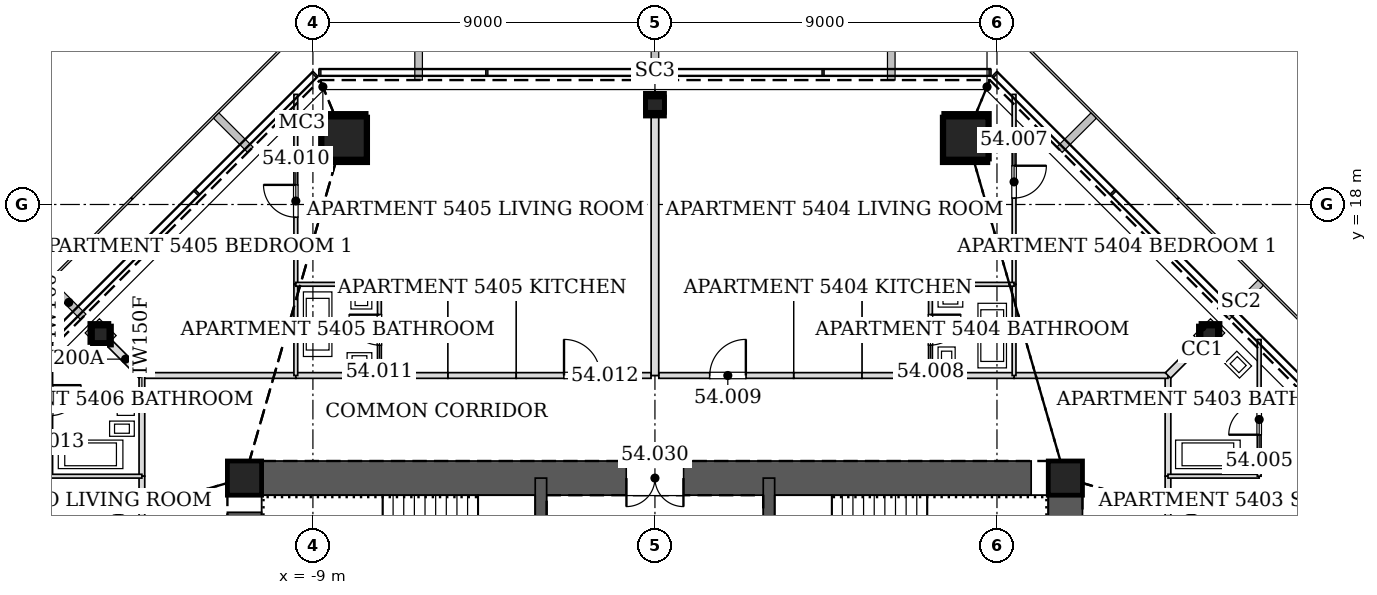
"""IFC4 building model, lengths in metres.
Left out: names, types, materials, properties, quantities, classifications, styles, units other than length and angle.
Written with IfcOpenShell. Run it as: python <this file> out.ifc"""

import sys

from ifc_helpers import new_model, si_unit, direction, frame, frame_2d, origin, origin_2d, place, context, subcontext, project, spatial, rectangle, hollow_rectangle, extrude, element, fill, save


model = new_model("IFC4")
c1 = context("Model", 3, precision=1e-05, world=origin(), true_north=direction((0.0, 1.0)))
c2 = subcontext(c1, "Body", "Model", "MODEL_VIEW")
j1 = project(units=[si_unit("LENGTHUNIT", "METRE"), si_unit("PLANEANGLEUNIT", "RADIAN")], contexts=[c1])
p1 = place(None, origin())
s1 = spatial("IfcSite", under=j1, at=p1, CompositionType="ELEMENT")
p2 = place(p1, origin())
s2 = spatial("IfcBuilding", under=s1, at=p2, CompositionType="ELEMENT")
p3 = place(p2, frame((0.0, 0.0, 231.2)))
s3 = spatial("IfcBuildingStorey", under=s2, at=p3, CompositionType="ELEMENT", Elevation=231.2)
for number, where, z_axis, x_axis in (
    (1, (8.2, 19.796, 0.0), (-0.012, -0.028, 1.0), (0.923, -0.384, 0.0)),
    (2, (-8.2, 19.796, 0.0), (0.012, -0.028, 1.0), (0.923, 0.384, 0.0)),
):
    element("IfcColumn", number, at=place(p3, frame(where, z_axis=z_axis, x_axis=x_axis)), inside=s3, PredefinedType="COLUMN", context=c2, shape_type="SweptSolid", body=[
        extrude(hollow_rectangle(XDim=1.2, YDim=1.2, WallThickness=0.055, at=origin_2d()), origin(), (0.0, 0.0, 1.0), 3.402),
    ])
for number, where, z_axis, x_axis in (
    (3, (14.619, 14.619, 0.0), (-0.02, -0.02, 1.0), (0.707, -0.707, 0.0)),
    (4, (0.0, 20.674, 0.0), (0.0, -0.028, 1.0), (1.0, 0.0, 0.0)),
    (5, (-14.619, 14.619, 0.0), (0.02, -0.02, 1.0), (0.707, 0.707, 0.0)),
):
    element("IfcColumn", number, at=place(p3, frame(where, z_axis=z_axis, x_axis=x_axis)), inside=s3, PredefinedType="COLUMN", context=c2, shape_type="SweptSolid", body=[
        extrude(hollow_rectangle(XDim=0.5, YDim=0.5, WallThickness=0.025, at=origin_2d()), origin(), (0.0, 0.0, 1.0), 3.402),
    ])
for number, where, z_axis, x_axis in (
    (6, (10.8, 10.8, 0.0), (0.0, 0.0, 1.0), (1.0, 0.0, 0.0)),
    (7, (-10.8, 10.8, 0.0), (0.0, 0.0, 1.0), (1.0, 0.0, 0.0)),
):
    element("IfcColumn", number, at=place(p3, frame(where, z_axis=z_axis, x_axis=x_axis)), inside=s3, PredefinedType="COLUMN", context=c2, shape_type="SweptSolid", body=[
        extrude(hollow_rectangle(XDim=0.9, YDim=0.9, WallThickness=0.05, at=origin_2d()), origin(), (0.0, 0.0, 1.0), 3.4),
    ])
p4 = place(p3, frame((10.8, -10.8, 0.0), z_axis=(0.0, 0.0, 1.0), x_axis=(0.0, 1.0, 0.0)))
e8 = element("IfcWall", 8, at=p4, inside=s3, PredefinedType="SOLIDWALL", context=c2, shape_type="SweptSolid", body=[
    extrude(rectangle(XDim=21.6, YDim=0.9, at=frame_2d((10.8, 0.0))), origin(), (0.0, 0.0, 1.0), 3.4),
])
p5 = place(p4, frame((11.7, 0.0, 0.0)))
e9 = element("IfcOpeningElement", 9, at=p5, cuts=e8, PredefinedType="OPENING", context=c2, shape_type="SweptSolid", body=[
    extrude(rectangle(XDim=1.2, YDim=2.1, at=frame_2d((0.6, 1.05))), frame((0.0, 0.46, 0.0), z_axis=(0.0, -1.0, 0.0), x_axis=(1.0, 0.0, 0.0)), (0.0, 0.0, 1.0), 0.92),
])
p6 = place(p4, frame((8.7, 0.0, 0.0)))
e10 = element("IfcOpeningElement", 10, at=p6, cuts=e8, PredefinedType="OPENING", context=c2, shape_type="SweptSolid", body=[
    extrude(rectangle(XDim=1.2, YDim=2.1, at=frame_2d((0.6, 1.05))), frame((0.0, 0.46, 0.0), z_axis=(0.0, -1.0, 0.0), x_axis=(1.0, 0.0, 0.0)), (0.0, 0.0, 1.0), 0.92),
])
p7 = place(p3, frame((10.8, 10.8, 0.0), z_axis=(0.0, 0.0, 1.0), x_axis=(-1.0, 0.0, 0.0)))
e11 = element("IfcWall", 11, at=p7, inside=s3, PredefinedType="SOLIDWALL", context=c2, shape_type="SweptSolid", body=[
    extrude(rectangle(XDim=21.6, YDim=0.9, at=frame_2d((10.8, 0.0))), origin(), (0.0, 0.0, 1.0), 3.4),
])
p8 = place(p7, frame((10.05, 0.0, 0.0)))
e12 = element("IfcOpeningElement", 12, at=p8, cuts=e11, PredefinedType="OPENING", context=c2, shape_type="SweptSolid", body=[
    extrude(rectangle(XDim=1.5, YDim=2.1, at=frame_2d((0.75, 1.05))), frame((0.0, 0.46, 0.0), z_axis=(0.0, -1.0, 0.0), x_axis=(1.0, 0.0, 0.0)), (0.0, 0.0, 1.0), 0.92),
])
p9 = place(p3, frame((-10.8, 10.8, 0.0), z_axis=(0.0, 0.0, 1.0), x_axis=(0.0, -1.0, 0.0)))
e13 = element("IfcWall", 13, at=p9, inside=s3, PredefinedType="SOLIDWALL", context=c2, shape_type="SweptSolid", body=[
    extrude(rectangle(XDim=21.6, YDim=0.9, at=frame_2d((10.8, 0.0))), origin(), (0.0, 0.0, 1.0), 3.4),
])
p10 = place(p9, frame((8.7, 0.0, 0.0)))
e14 = element("IfcOpeningElement", 14, at=p10, cuts=e13, PredefinedType="OPENING", context=c2, shape_type="SweptSolid", body=[
    extrude(rectangle(XDim=1.2, YDim=2.1, at=frame_2d((0.6, 1.05))), frame((0.0, 0.46, 0.0), z_axis=(0.0, -1.0, 0.0), x_axis=(1.0, 0.0, 0.0)), (0.0, 0.0, 1.0), 0.92),
])
p11 = place(p9, frame((11.7, 0.0, 0.0)))
e15 = element("IfcOpeningElement", 15, at=p11, cuts=e13, PredefinedType="OPENING", context=c2, shape_type="SweptSolid", body=[
    extrude(rectangle(XDim=1.2, YDim=2.1, at=frame_2d((0.6, 1.05))), frame((0.0, 0.46, 0.0), z_axis=(0.0, -1.0, 0.0), x_axis=(1.0, 0.0, 0.0)), (0.0, 0.0, 1.0), 0.92),
])
p12 = place(p3, frame((-3.0, 6.0, 0.0), z_axis=(0.0, 0.0, 1.0), x_axis=(0.0, 1.0, 0.0)))
e16 = element("IfcWall", 16, at=p12, inside=s3, PredefinedType="SOLIDWALL", context=c2, shape_type="SweptSolid", body=[
    extrude(rectangle(XDim=4.8, YDim=0.3, at=frame_2d((2.4, 0.0))), origin(), (0.0, 0.0, 1.0), 3.4),
])
p13 = place(p12, frame((1.75, 0.0, 0.0)))
e17 = element("IfcOpeningElement", 17, at=p13, cuts=e16, PredefinedType="OPENING", context=c2, shape_type="SweptSolid", body=[
    extrude(rectangle(XDim=1.0, YDim=2.1, at=frame_2d((0.5, 1.05))), frame((0.0, 0.16, 0.0), z_axis=(0.0, -1.0, 0.0), x_axis=(1.0, 0.0, 0.0)), (0.0, 0.0, 1.0), 0.32),
])
p14 = place(p3, frame((3.0, 6.0, 0.0), z_axis=(0.0, 0.0, 1.0), x_axis=(0.0, 1.0, 0.0)))
e18 = element("IfcWall", 18, at=p14, inside=s3, PredefinedType="SOLIDWALL", context=c2, shape_type="SweptSolid", body=[
    extrude(rectangle(XDim=4.8, YDim=0.3, at=frame_2d((2.4, 0.0))), origin(), (0.0, 0.0, 1.0), 3.4),
])
p15 = place(p14, frame((1.75, 0.0, 0.0)))
e19 = element("IfcOpeningElement", 19, at=p15, cuts=e18, PredefinedType="OPENING", context=c2, shape_type="SweptSolid", body=[
    extrude(rectangle(XDim=1.0, YDim=2.1, at=frame_2d((0.5, 1.05))), frame((0.0, 0.16, 0.0), z_axis=(0.0, -1.0, 0.0), x_axis=(1.0, 0.0, 0.0)), (0.0, 0.0, 1.0), 0.32),
])
p16 = place(p3, frame((13.5, 10.849, 0.0), z_axis=(0.0, 0.0, 1.0), x_axis=(0.0, 1.0, 0.0)))
e20 = element("IfcWall", 20, at=p16, inside=s3, PredefinedType="PARTITIONING", context=c2, shape_type="SweptSolid", body=[
    extrude(rectangle(XDim=2.651, YDim=0.15, at=frame_2d((1.325, 0.0))), origin(), (0.0, 0.0, 1.0), 2.583),
])
p17 = place(p3, frame((13.5, 9.049, 0.0), z_axis=(0.0, 0.0, 1.0), x_axis=(0.0, 1.0, 0.0)))
e21 = element("IfcWall", 21, at=p17, inside=s3, PredefinedType="PARTITIONING", context=c2, shape_type="SweptSolid", body=[
    extrude(rectangle(XDim=1.802, YDim=0.15, at=frame_2d((0.901, 0.0))), origin(), (0.0, 0.0, 1.0), 2.344),
])
p18 = place(p3, frame((13.5, 13.5, 0.0), z_axis=(0.0, 0.0, 1.0), x_axis=(-1.0, 0.0, 0.0)))
e22 = element("IfcWall", 22, at=p18, inside=s3, PredefinedType="PARTITIONING", context=c2, shape_type="SweptSolid", body=[
    extrude(rectangle(XDim=4.051, YDim=0.15, at=frame_2d((2.025, 0.0))), origin(), (0.0, 0.0, 1.0), 2.344),
])
p19 = place(p3, frame((9.451, 13.5, 0.0), z_axis=(0.0, 0.0, 1.0), x_axis=(-1.0, 0.0, 0.0)))
e23 = element("IfcWall", 23, at=p19, inside=s3, PredefinedType="PARTITIONING", context=c2, shape_type="SweptSolid", body=[
    extrude(rectangle(XDim=2.202, YDim=0.15, at=frame_2d((1.101, 0.0))), origin(), (0.0, 0.0, 1.0), 3.2),
])
p20 = place(p3, frame((5.451, 13.5, 0.0), z_axis=(0.0, 0.0, 1.0), x_axis=(-1.0, 0.0, 0.0)))
e24 = element("IfcWall", 24, at=p20, inside=s3, PredefinedType="PARTITIONING", context=c2, shape_type="SweptSolid", body=[
    extrude(rectangle(XDim=1.802, YDim=0.15, at=frame_2d((0.901, 0.0))), origin(), (0.0, 0.0, 1.0), 3.2),
])
p21 = place(p3, frame((3.651, 13.5, 0.0), z_axis=(0.0, 0.0, 1.0), x_axis=(-1.0, 0.0, 0.0)))
e25 = element("IfcWall", 25, at=p21, inside=s3, PredefinedType="PARTITIONING", context=c2, shape_type="SweptSolid", body=[
    extrude(rectangle(XDim=3.549, YDim=0.15, at=frame_2d((1.774, 0.0))), origin(), (0.0, 0.0, 1.0), 3.2),
])
p22 = place(p21, frame((1.259, 0.0, 0.0)))
e26 = element("IfcOpeningElement", 26, at=p22, cuts=e25, PredefinedType="OPENING", context=c2, shape_type="SweptSolid", body=[
    extrude(rectangle(XDim=0.95, YDim=2.1, at=frame_2d((0.475, 1.05))), frame((0.0, 0.085, 0.0), z_axis=(0.0, -1.0, 0.0), x_axis=(1.0, 0.0, 0.0)), (0.0, 0.0, 1.0), 0.17),
])
p23 = place(p3, frame((7.251, 13.5, 0.0), z_axis=(0.0, 0.0, 1.0), x_axis=(-1.0, 0.0, 0.0)))
e27 = element("IfcWall", 27, at=p23, inside=s3, PredefinedType="PARTITIONING", context=c2, shape_type="SweptSolid", body=[
    extrude(rectangle(XDim=1.802, YDim=0.15, at=frame_2d((0.901, 0.0))), origin(), (0.0, 0.0, 1.0), 3.2),
])
p24 = place(p3, frame((-9.449, 13.5, 0.0), z_axis=(0.0, 0.0, 1.0), x_axis=(-1.0, 0.0, 0.0)))
e28 = element("IfcWall", 28, at=p24, inside=s3, PredefinedType="PARTITIONING", context=c2, shape_type="SweptSolid", body=[
    extrude(rectangle(XDim=4.051, YDim=0.15, at=frame_2d((2.025, 0.0))), origin(), (0.0, 0.0, 1.0), 2.344),
])
p25 = place(p3, frame((-7.249, 13.5, 0.0), z_axis=(0.0, 0.0, 1.0), x_axis=(-1.0, 0.0, 0.0)))
e29 = element("IfcWall", 29, at=p25, inside=s3, PredefinedType="PARTITIONING", context=c2, shape_type="SweptSolid", body=[
    extrude(rectangle(XDim=2.202, YDim=0.15, at=frame_2d((1.101, 0.0))), origin(), (0.0, 0.0, 1.0), 3.2),
])
for number, where, z_axis, x_axis in (
    (30, (-3.649, 13.5, 0.0), (0.0, 0.0, 1.0), (-1.0, 0.0, 0.0)),
    (31, (-5.449, 13.5, 0.0), (0.0, 0.0, 1.0), (-1.0, 0.0, 0.0)),
):
    element("IfcWall", number, at=place(p3, frame(where, z_axis=z_axis, x_axis=x_axis)), inside=s3, PredefinedType="PARTITIONING", context=c2, shape_type="SweptSolid", body=[
        extrude(rectangle(XDim=1.802, YDim=0.15, at=frame_2d((0.901, 0.0))), origin(), (0.0, 0.0, 1.0), 3.2),
    ])
p26 = place(p3, frame((-0.102, 13.5, 0.0), z_axis=(0.0, 0.0, 1.0), x_axis=(-1.0, 0.0, 0.0)))
e32 = element("IfcWall", 32, at=p26, inside=s3, PredefinedType="PARTITIONING", context=c2, shape_type="SweptSolid", body=[
    extrude(rectangle(XDim=3.549, YDim=0.15, at=frame_2d((1.774, 0.0))), origin(), (0.0, 0.0, 1.0), 3.2),
])
p27 = place(p26, frame((1.34, 0.0, 0.0)))
e33 = element("IfcOpeningElement", 33, at=p27, cuts=e32, PredefinedType="OPENING", context=c2, shape_type="SweptSolid", body=[
    extrude(rectangle(XDim=0.95, YDim=2.1, at=frame_2d((0.475, 1.05))), frame((0.0, 0.085, 0.0), z_axis=(0.0, -1.0, 0.0), x_axis=(1.0, 0.0, 0.0)), (0.0, 0.0, 1.0), 0.17),
])
p28 = place(p3, frame((-13.5, 13.5, 0.0), z_axis=(0.0, 0.0, 1.0), x_axis=(0.0, -1.0, 0.0)))
e34 = element("IfcWall", 34, at=p28, inside=s3, PredefinedType="PARTITIONING", context=c2, shape_type="SweptSolid", body=[
    extrude(rectangle(XDim=2.651, YDim=0.15, at=frame_2d((1.325, 0.0))), origin(), (0.0, 0.0, 1.0), 2.583),
])
p29 = place(p3, frame((-13.5, 10.851, 0.0), z_axis=(0.0, 0.0, 1.0), x_axis=(0.0, -1.0, 0.0)))
e35 = element("IfcWall", 35, at=p29, inside=s3, PredefinedType="PARTITIONING", context=c2, shape_type="SweptSolid", body=[
    extrude(rectangle(XDim=1.802, YDim=0.15, at=frame_2d((0.901, 0.0))), origin(), (0.0, 0.0, 1.0), 2.344),
])
p30 = place(p3, frame((13.5, 10.85, 0.0), z_axis=(0.0, 0.0, 1.0), x_axis=(1.0, 0.0, 0.0)))
e36 = element("IfcWall", 36, at=p30, inside=s3, PredefinedType="PARTITIONING", context=c2, shape_type="SweptSolid", body=[
    extrude(rectangle(XDim=2.4, YDim=0.1, at=frame_2d((1.2, 0.0))), origin(), (0.0, 0.0, 1.0), 2.786),
])
p31 = place(p3, frame((15.9, 10.85, 0.0), z_axis=(0.0, 0.0, 1.0), x_axis=(0.0, 1.0, 0.0)))
e37 = element("IfcWall", 37, at=p31, inside=s3, PredefinedType="PARTITIONING", context=c2, shape_type="SweptSolid", body=[
    extrude(rectangle(XDim=3.597, YDim=0.1, at=frame_2d((1.799, 0.0))), origin(), (0.0, 0.0, 1.0), 2.784),
])
p32 = place(p31, frame((1.092, 0.0, 0.0)))
e38 = element("IfcOpeningElement", 38, at=p32, cuts=e37, PredefinedType="OPENING", context=c2, shape_type="SweptSolid", body=[
    extrude(rectangle(XDim=0.8, YDim=2.1, at=frame_2d((0.4, 1.05))), frame((0.0, 0.06, 0.0), z_axis=(0.0, -1.0, 0.0), x_axis=(1.0, 0.0, 0.0)), (0.0, 0.0, 1.0), 0.12),
])
p33 = place(p3, frame((14.361, 14.361, 0.0), z_axis=(0.0, 0.0, 1.0), x_axis=(-0.707106781187, -0.707106781187, 0.0)))
e39 = element("IfcWall", 39, at=p33, inside=s3, PredefinedType="PARTITIONING", context=c2, shape_type="SweptSolid", body=[
    extrude(rectangle(XDim=1.217, YDim=0.2, at=frame_2d((0.608, 0.0))), origin(), (0.0, 0.0, 1.0), 2.583),
])
p34 = place(p3, frame((9.45, 15.901, 0.0), z_axis=(0.0, 0.0, 1.0), x_axis=(0.0, -1.0, 0.0)))
e40 = element("IfcWall", 40, at=p34, inside=s3, PredefinedType="PARTITIONING", context=c2, shape_type="SweptSolid", body=[
    extrude(rectangle(XDim=2.401, YDim=0.1, at=frame_2d((1.2, 0.0))), origin(), (0.0, 0.0, 1.0), 2.344),
])
p35 = place(p3, frame((9.45, 20.898, 0.0), z_axis=(0.0, 0.0, 1.0), x_axis=(0.0, -1.0, 0.0)))
e41 = element("IfcWall", 41, at=p35, inside=s3, PredefinedType="PARTITIONING", context=c2, shape_type="SweptSolid", body=[
    extrude(rectangle(XDim=4.999, YDim=0.1, at=frame_2d((2.5, 0.0))), origin(), (0.0, 0.0, 1.0), 2.344),
])
p36 = place(p35, frame((1.877, 0.0, 0.0)))
e42 = element("IfcOpeningElement", 42, at=p36, cuts=e41, PredefinedType="OPENING", context=c2, shape_type="SweptSolid", body=[
    extrude(rectangle(XDim=0.85, YDim=2.1, at=frame_2d((0.425, 1.05))), frame((0.0, 0.06, 0.0), z_axis=(0.0, -1.0, 0.0), x_axis=(1.0, 0.0, 0.0)), (0.0, 0.0, 1.0), 0.12),
])
p37 = place(p3, frame((9.45, 15.9, 0.0), z_axis=(0.0, 0.0, 1.0), x_axis=(-1.0, 0.0, 0.0)))
e43 = element("IfcWall", 43, at=p37, inside=s3, PredefinedType="PARTITIONING", context=c2, shape_type="SweptSolid", body=[
    extrude(rectangle(XDim=2.2, YDim=0.1, at=frame_2d((1.1, 0.0))), origin(), (0.0, 0.0, 1.0), 2.344),
])
p38 = place(p3, frame((7.25, 15.9, 0.0), z_axis=(0.0, 0.0, 1.0), x_axis=(0.0, -1.0, 0.0)))
e44 = element("IfcWall", 44, at=p38, inside=s3, PredefinedType="PARTITIONING", context=c2, shape_type="SweptSolid", body=[
    extrude(rectangle(XDim=2.4, YDim=0.1, at=frame_2d((1.2, 0.0))), origin(), (0.0, 0.0, 1.0), 2.664),
])
p39 = place(p38, frame((0.8, 0.0, 0.0)))
e45 = element("IfcOpeningElement", 45, at=p39, cuts=e44, PredefinedType="OPENING", context=c2, shape_type="SweptSolid", body=[
    extrude(rectangle(XDim=0.8, YDim=2.1, at=frame_2d((0.4, 1.05))), frame((0.0, 0.06, 0.0), z_axis=(0.0, -1.0, 0.0), x_axis=(1.0, 0.0, 0.0)), (0.0, 0.0, 1.0), 0.12),
])
p40 = place(p3, frame((0.0, 20.309, 0.0), z_axis=(0.0, 0.0, 1.0), x_axis=(0.0, -1.0, 0.0)))
e46 = element("IfcWall", 46, at=p40, inside=s3, PredefinedType="PARTITIONING", context=c2, shape_type="SweptSolid", body=[
    extrude(rectangle(XDim=6.809, YDim=0.2, at=frame_2d((3.405, 0.0))), origin(), (0.0, 0.0, 1.0), 2.253),
])
p41 = place(p3, frame((-9.45, 13.5, 0.0), z_axis=(0.0, 0.0, 1.0), x_axis=(0.0, 1.0, 0.0)))
e47 = element("IfcWall", 47, at=p41, inside=s3, PredefinedType="PARTITIONING", context=c2, shape_type="SweptSolid", body=[
    extrude(rectangle(XDim=2.401, YDim=0.1, at=frame_2d((1.2, 0.0))), origin(), (0.0, 0.0, 1.0), 2.344),
])
p42 = place(p3, frame((-9.45, 15.899, 0.0), z_axis=(0.0, 0.0, 1.0), x_axis=(0.0, 1.0, 0.0)))
e48 = element("IfcWall", 48, at=p42, inside=s3, PredefinedType="PARTITIONING", context=c2, shape_type="SweptSolid", body=[
    extrude(rectangle(XDim=4.999, YDim=0.1, at=frame_2d((2.5, 0.0))), origin(), (0.0, 0.0, 1.0), 2.344),
])
p43 = place(p42, frame((1.767, 0.0, 0.0)))
e49 = element("IfcOpeningElement", 49, at=p43, cuts=e48, PredefinedType="OPENING", context=c2, shape_type="SweptSolid", body=[
    extrude(rectangle(XDim=0.85, YDim=2.1, at=frame_2d((0.425, 1.05))), frame((0.0, 0.06, 0.0), z_axis=(0.0, -1.0, 0.0), x_axis=(1.0, 0.0, 0.0)), (0.0, 0.0, 1.0), 0.12),
])
p44 = place(p3, frame((-14.361, 14.361, 0.0), z_axis=(0.0, 0.0, 1.0), x_axis=(0.707106781187, -0.707106781187, 0.0)))
e50 = element("IfcWall", 50, at=p44, inside=s3, PredefinedType="PARTITIONING", context=c2, shape_type="SweptSolid", body=[
    extrude(rectangle(XDim=1.217, YDim=0.2, at=frame_2d((0.608, 0.0))), origin(), (0.0, 0.0, 1.0), 2.583),
])
p45 = place(p3, frame((-7.25, 13.5, 0.0), z_axis=(0.0, 0.0, 1.0), x_axis=(0.0, 1.0, 0.0)))
e51 = element("IfcWall", 51, at=p45, inside=s3, PredefinedType="PARTITIONING", context=c2, shape_type="SweptSolid", body=[
    extrude(rectangle(XDim=2.4, YDim=0.1, at=frame_2d((1.2, 0.0))), origin(), (0.0, 0.0, 1.0), 2.664),
])
p46 = place(p45, frame((0.8, 0.0, 0.0)))
e52 = element("IfcOpeningElement", 52, at=p46, cuts=e51, PredefinedType="OPENING", context=c2, shape_type="SweptSolid", body=[
    extrude(rectangle(XDim=0.8, YDim=2.1, at=frame_2d((0.4, 1.05))), frame((0.0, 0.06, 0.0), z_axis=(0.0, -1.0, 0.0), x_axis=(1.0, 0.0, 0.0)), (0.0, 0.0, 1.0), 0.12),
])
p47 = place(p3, frame((-7.25, 15.9, 0.0), z_axis=(0.0, 0.0, 1.0), x_axis=(-1.0, 0.0, 0.0)))
e53 = element("IfcWall", 53, at=p47, inside=s3, PredefinedType="PARTITIONING", context=c2, shape_type="SweptSolid", body=[
    extrude(rectangle(XDim=2.2, YDim=0.1, at=frame_2d((1.1, 0.0))), origin(), (0.0, 0.0, 1.0), 2.344),
])
p48 = place(p3, frame((-15.9, 14.448, 0.0), z_axis=(0.0, 0.0, 1.0), x_axis=(0.0, -1.0, 0.0)))
e54 = element("IfcWall", 54, at=p48, inside=s3, PredefinedType="PARTITIONING", context=c2, shape_type="SweptSolid", body=[
    extrude(rectangle(XDim=3.597, YDim=0.1, at=frame_2d((1.799, 0.0))), origin(), (0.0, 0.0, 1.0), 2.784),
])
p49 = place(p48, frame((1.202, 0.0, 0.0)))
e55 = element("IfcOpeningElement", 55, at=p49, cuts=e54, PredefinedType="OPENING", context=c2, shape_type="SweptSolid", body=[
    extrude(rectangle(XDim=0.8, YDim=2.1, at=frame_2d((0.4, 1.05))), frame((0.0, 0.06, 0.0), z_axis=(0.0, -1.0, 0.0), x_axis=(1.0, 0.0, 0.0)), (0.0, 0.0, 1.0), 0.12),
])
p50 = place(p3, frame((-15.9, 10.85, 0.0), z_axis=(0.0, 0.0, 1.0), x_axis=(1.0, 0.0, 0.0)))
e56 = element("IfcWall", 56, at=p50, inside=s3, PredefinedType="PARTITIONING", context=c2, shape_type="SweptSolid", body=[
    extrude(rectangle(XDim=2.4, YDim=0.1, at=frame_2d((1.2, 0.0))), origin(), (0.0, 0.0, 1.0), 2.786),
])
p51 = place(p32, origin())
e57 = element("IfcDoor", 57, at=p51, inside=s3, OperationType="SINGLE_SWING_LEFT", PredefinedType="DOOR", context=c2, shape_type="SweptSolid", body=[
    extrude(rectangle(XDim=0.8, YDim=2.1, at=frame_2d((0.4, 1.05))), frame((0.0, 0.025, 0.0), z_axis=(0.0, -1.0, 0.0), x_axis=(1.0, 0.0, 0.0)), (0.0, 0.0, 1.0), 0.05),
])
fill(e38, e57)
p52 = place(p36, origin())
e58 = element("IfcDoor", 58, at=p52, inside=s3, OperationType="SINGLE_SWING_LEFT", PredefinedType="DOOR", context=c2, shape_type="SweptSolid", body=[
    extrude(rectangle(XDim=0.85, YDim=2.1, at=frame_2d((0.425, 1.05))), frame((0.0, 0.025, 0.0), z_axis=(0.0, -1.0, 0.0), x_axis=(1.0, 0.0, 0.0)), (0.0, 0.0, 1.0), 0.05),
])
fill(e42, e58)
p53 = place(p39, origin())
e59 = element("IfcDoor", 59, at=p53, inside=s3, OperationType="SINGLE_SWING_LEFT", PredefinedType="DOOR", context=c2, shape_type="SweptSolid", body=[
    extrude(rectangle(XDim=0.8, YDim=2.1, at=frame_2d((0.4, 1.05))), frame((0.0, 0.025, 0.0), z_axis=(0.0, -1.0, 0.0), x_axis=(1.0, 0.0, 0.0)), (0.0, 0.0, 1.0), 0.05),
])
fill(e45, e59)
p54 = place(p22, frame((0.95, 0.0, 0.0), z_axis=(0.0, 0.0, 1.0), x_axis=(-1.0, 0.0, 0.0)))
e60 = element("IfcDoor", 60, at=p54, inside=s3, OperationType="SINGLE_SWING_RIGHT", PredefinedType="DOOR", context=c2, shape_type="SweptSolid", body=[
    extrude(rectangle(XDim=0.95, YDim=2.1, at=frame_2d((0.475, 1.05))), frame((0.0, 0.025, 0.0), z_axis=(0.0, -1.0, 0.0), x_axis=(1.0, 0.0, 0.0)), (0.0, 0.0, 1.0), 0.05),
])
fill(e26, e60)
p55 = place(p43, origin())
e61 = element("IfcDoor", 61, at=p55, inside=s3, OperationType="SINGLE_SWING_RIGHT", PredefinedType="DOOR", context=c2, shape_type="SweptSolid", body=[
    extrude(rectangle(XDim=0.85, YDim=2.1, at=frame_2d((0.425, 1.05))), frame((0.0, 0.025, 0.0), z_axis=(0.0, -1.0, 0.0), x_axis=(1.0, 0.0, 0.0)), (0.0, 0.0, 1.0), 0.05),
])
fill(e49, e61)
p56 = place(p46, origin())
e62 = element("IfcDoor", 62, at=p56, inside=s3, OperationType="SINGLE_SWING_RIGHT", PredefinedType="DOOR", context=c2, shape_type="SweptSolid", body=[
    extrude(rectangle(XDim=0.8, YDim=2.1, at=frame_2d((0.4, 1.05))), frame((0.0, 0.025, 0.0), z_axis=(0.0, -1.0, 0.0), x_axis=(1.0, 0.0, 0.0)), (0.0, 0.0, 1.0), 0.05),
])
fill(e52, e62)
p57 = place(p27, frame((0.95, 0.0, 0.0), z_axis=(0.0, 0.0, 1.0), x_axis=(-1.0, 0.0, 0.0)))
e63 = element("IfcDoor", 63, at=p57, inside=s3, OperationType="SINGLE_SWING_LEFT", PredefinedType="DOOR", context=c2, shape_type="SweptSolid", body=[
    extrude(rectangle(XDim=0.95, YDim=2.1, at=frame_2d((0.475, 1.05))), frame((0.0, 0.025, 0.0), z_axis=(0.0, -1.0, 0.0), x_axis=(1.0, 0.0, 0.0)), (0.0, 0.0, 1.0), 0.05),
])
fill(e33, e63)
p58 = place(p8, origin())
e64 = element("IfcDoor", 64, at=p58, inside=s3, OperationType="DOUBLE_DOOR_SINGLE_SWING", PredefinedType="DOOR", context=c2, shape_type="SweptSolid", body=[
    extrude(rectangle(XDim=1.5, YDim=2.1, at=frame_2d((0.75, 1.05))), frame((0.0, 0.025, 0.0), z_axis=(0.0, -1.0, 0.0), x_axis=(1.0, 0.0, 0.0)), (0.0, 0.0, 1.0), 0.05),
])
fill(e12, e64)
save(model, sys.argv[1])
